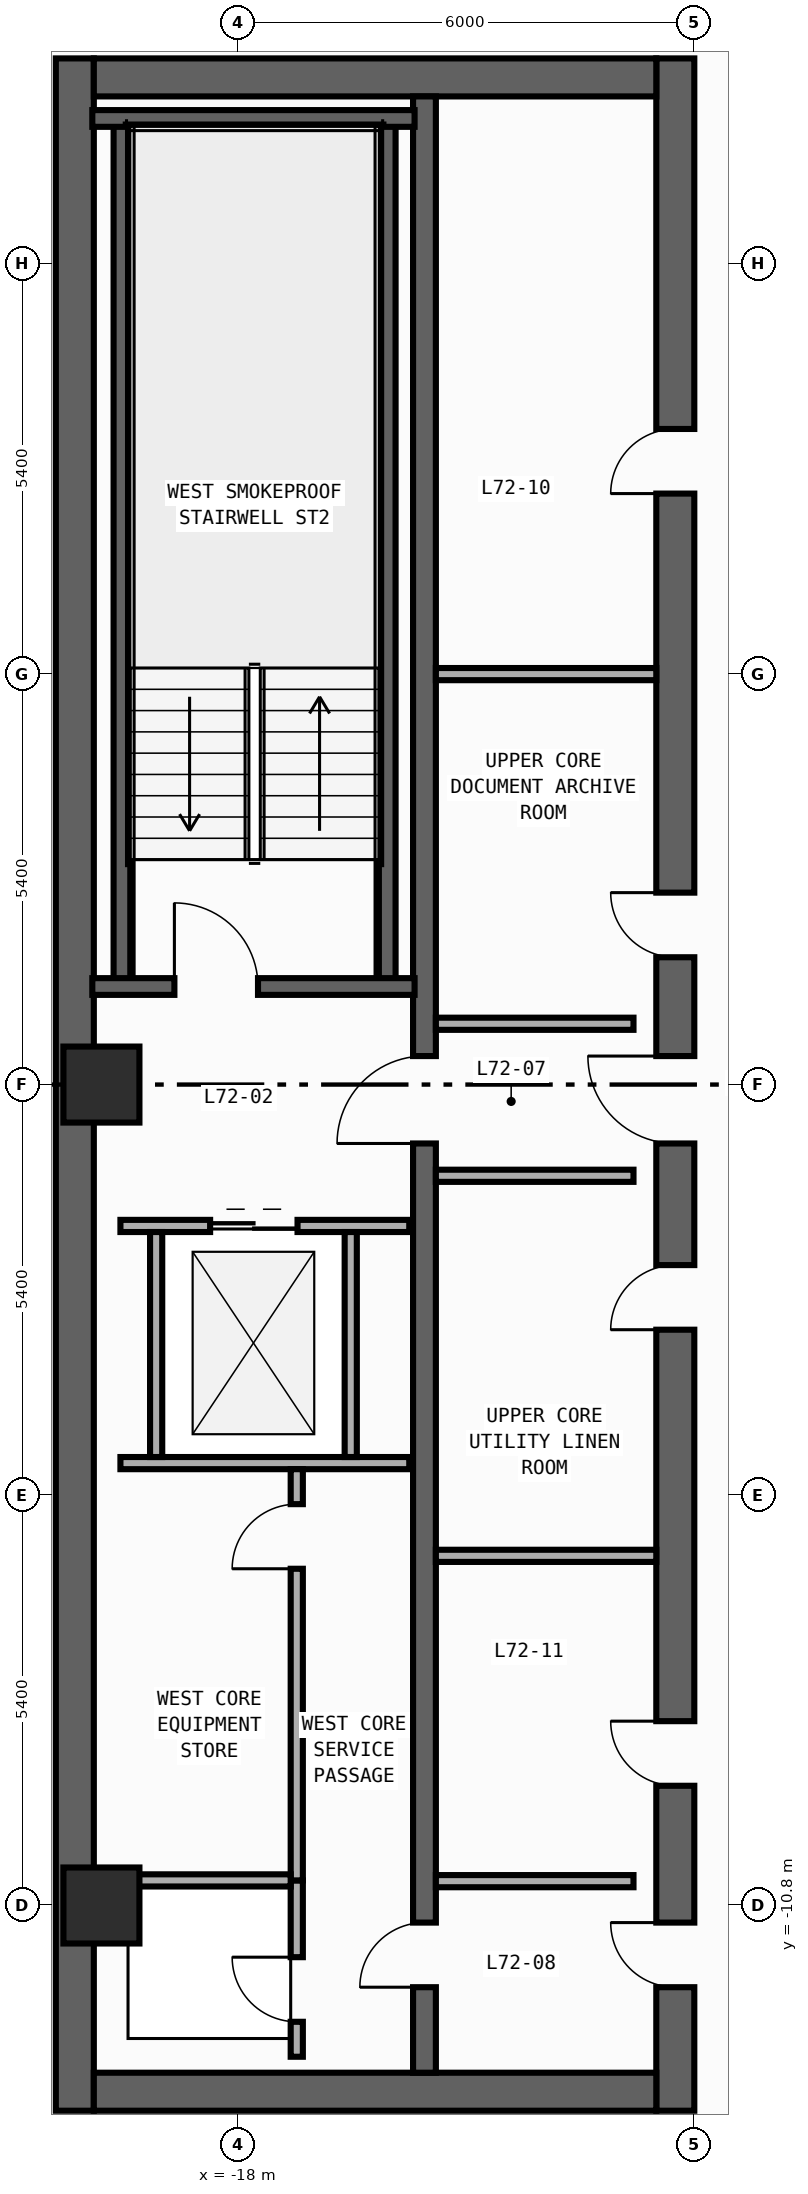
"""IFC4 building model, lengths in metres.
Left out: names, types, materials, properties, quantities, classifications, styles, units other than length and angle.
Written with IfcOpenShell. Run it as: python <this file> out.ifc"""

import sys

from ifc_helpers import new_model, si_unit, direction, frame, frame_2d, origin, origin_2d, place, context, subcontext, project, spatial, rectangle, circle, extrude, element, fill, save


model = new_model("IFC4")
c1 = context("Model", 3, precision=1e-05, world=origin(), true_north=direction((0.0, 1.0)))
c2 = subcontext(c1, "Body", "Model", "MODEL_VIEW")
j1 = project(units=[si_unit("LENGTHUNIT", "METRE"), si_unit("PLANEANGLEUNIT", "RADIAN")], contexts=[c1])
p1 = place(None, origin())
s1 = spatial("IfcSite", under=j1, at=p1, CompositionType="ELEMENT")
p2 = place(p1, origin())
s2 = spatial("IfcBuilding", under=s1, at=p2, CompositionType="ELEMENT")
p3 = place(p2, frame((0.0, 0.0, 300.4)))
s3 = spatial("IfcBuildingStorey", under=s2, at=p3, CompositionType="ELEMENT", Elevation=300.4)
p4 = place(p3, frame((-20.15, -13.5, 0.0), z_axis=(0.0, 0.0, 1.0), x_axis=(0.0, 1.0, 0.0)))
e1 = element("IfcWall", 1, at=p4, inside=s3, PredefinedType="SHEAR", context=c2, shape_type="SweptSolid", body=[
    extrude(rectangle(XDim=27.0, YDim=0.5, at=frame_2d((13.5, 0.0))), origin(), (0.0, 0.0, 1.0), 3.54),
])
p5 = place(p3, frame((-12.25, -13.5, 0.0), z_axis=(0.0, 0.0, 1.0), x_axis=(0.0, 1.0, 0.0)))
e2 = element("IfcWall", 2, at=p5, inside=s3, PredefinedType="SHEAR", context=c2, shape_type="SweptSolid", body=[
    extrude(rectangle(XDim=27.0, YDim=0.5, at=frame_2d((13.5, 0.0))), origin(), (0.0, 0.0, 1.0), 3.54),
])
p6 = place(p5, frame((15.175, 0.0, 0.0)))
e3 = element("IfcOpeningElement", 3, at=p6, cuts=e2, PredefinedType="OPENING", context=c2, shape_type="SweptSolid", body=[
    extrude(rectangle(XDim=0.85, YDim=2.1, at=frame_2d((0.425, 1.05))), frame((0.0, 0.26, 0.0), z_axis=(0.0, -1.0, 0.0), x_axis=(1.0, 0.0, 0.0)), (0.0, 0.0, 1.0), 0.52),
])
p7 = place(p5, frame((21.275, 0.0, 0.0)))
e4 = element("IfcOpeningElement", 4, at=p7, cuts=e2, PredefinedType="OPENING", context=c2, shape_type="SweptSolid", body=[
    extrude(rectangle(XDim=0.85, YDim=2.1, at=frame_2d((0.425, 1.05))), frame((0.0, 0.26, 0.0), z_axis=(0.0, -1.0, 0.0), x_axis=(1.0, 0.0, 0.0)), (0.0, 0.0, 1.0), 0.52),
])
p8 = place(p5, frame((4.275, 0.0, 0.0)))
e5 = element("IfcOpeningElement", 5, at=p8, cuts=e2, PredefinedType="OPENING", context=c2, shape_type="SweptSolid", body=[
    extrude(rectangle(XDim=0.85, YDim=2.1, at=frame_2d((0.425, 1.05))), frame((0.0, 0.26, 0.0), z_axis=(0.0, -1.0, 0.0), x_axis=(1.0, 0.0, 0.0)), (0.0, 0.0, 1.0), 0.52),
])
p9 = place(p5, frame((10.275, 0.0, 0.0)))
e6 = element("IfcOpeningElement", 6, at=p9, cuts=e2, PredefinedType="OPENING", context=c2, shape_type="SweptSolid", body=[
    extrude(rectangle(XDim=0.85, YDim=2.1, at=frame_2d((0.425, 1.05))), frame((0.0, 0.26, 0.0), z_axis=(0.0, -1.0, 0.0), x_axis=(1.0, 0.0, 0.0)), (0.0, 0.0, 1.0), 0.52),
])
p10 = place(p5, frame((12.725, 0.0, 0.0)))
e7 = element("IfcOpeningElement", 7, at=p10, cuts=e2, PredefinedType="OPENING", context=c2, shape_type="SweptSolid", body=[
    extrude(rectangle(XDim=1.15, YDim=2.2, at=frame_2d((0.575, 1.1))), frame((0.0, 0.26, 0.0), z_axis=(0.0, -1.0, 0.0), x_axis=(1.0, 0.0, 0.0)), (0.0, 0.0, 1.0), 0.52),
])
p11 = place(p5, frame((1.625, 0.0, 0.0)))
e8 = element("IfcOpeningElement", 8, at=p11, cuts=e2, PredefinedType="OPENING", context=c2, shape_type="SweptSolid", body=[
    extrude(rectangle(XDim=0.85, YDim=2.1, at=frame_2d((0.425, 1.05))), frame((0.0, 0.26, 0.0), z_axis=(0.0, -1.0, 0.0), x_axis=(1.0, 0.0, 0.0)), (0.0, 0.0, 1.0), 0.52),
])
for number, where, z_axis, x_axis in (
    (9, (-19.9, -13.25, 0.0), (0.0, 0.0, 1.0), (1.0, 0.0, 0.0)),
    (10, (-19.9, 13.25, 0.0), (0.0, 0.0, 1.0), (1.0, 0.0, 0.0)),
):
    element("IfcWall", number, at=place(p3, frame(where, z_axis=z_axis, x_axis=x_axis)), inside=s3, PredefinedType="SHEAR", context=c2, shape_type="SweptSolid", body=[
        extrude(rectangle(XDim=7.4, YDim=0.5, at=frame_2d((3.7, 0.0))), origin(), (0.0, 0.0, 1.0), 3.54),
    ])
p12 = place(p3, frame((-15.55, -13.0, 0.0), z_axis=(0.0, 0.0, 1.0), x_axis=(0.0, 1.0, 0.0)))
e11 = element("IfcWall", 11, at=p12, inside=s3, PredefinedType="SHEAR", context=c2, shape_type="SweptSolid", body=[
    extrude(rectangle(XDim=26.0, YDim=0.3, at=frame_2d((13.0, 0.0))), origin(), (0.0, 0.0, 1.0), 3.54),
])
p13 = place(p12, frame((12.225, 0.0, 0.0)))
e12 = element("IfcOpeningElement", 12, at=p13, cuts=e11, PredefinedType="OPENING", context=c2, shape_type="SweptSolid", body=[
    extrude(rectangle(XDim=1.15, YDim=2.2, at=frame_2d((0.575, 1.1))), frame((0.0, 0.16, 0.0), z_axis=(0.0, -1.0, 0.0), x_axis=(1.0, 0.0, 0.0)), (0.0, 0.0, 1.0), 0.32),
])
p14 = place(p12, frame((1.125, 0.0, 0.0)))
e13 = element("IfcOpeningElement", 13, at=p14, cuts=e11, PredefinedType="OPENING", context=c2, shape_type="SweptSolid", body=[
    extrude(rectangle(XDim=0.85, YDim=2.1, at=frame_2d((0.425, 1.05))), frame((0.0, 0.16, 0.0), z_axis=(0.0, -1.0, 0.0), x_axis=(1.0, 0.0, 0.0)), (0.0, 0.0, 1.0), 0.32),
])
for number, where, z_axis, x_axis in (
    (14, (-16.04, 1.29, 0.0), (0.0, 0.0, 1.0), (0.0, 1.0, 0.0)),
    (15, (-19.53, 1.29, 0.0), (0.0, 0.0, 1.0), (0.0, 1.0, 0.0)),
):
    element("IfcWall", number, at=place(p3, frame(where, z_axis=z_axis, x_axis=x_axis)), inside=s3, PredefinedType="SHEAR", context=c2, shape_type="SweptSolid", body=[
        extrude(rectangle(XDim=11.42, YDim=0.22, at=frame_2d((5.71, 0.0))), origin(), (0.0, 0.0, 1.0), 3.54),
    ])
p15 = place(p3, frame((-19.92, 12.71, 0.0), z_axis=(0.0, 0.0, 1.0), x_axis=(1.0, 0.0, 0.0)))
e16 = element("IfcWall", 16, at=p15, inside=s3, PredefinedType="SHEAR", context=c2, shape_type="SweptSolid", body=[
    extrude(rectangle(XDim=4.24, YDim=0.22, at=frame_2d((2.12, 0.0))), origin(), (0.0, 0.0, 1.0), 3.54),
])
p16 = place(p3, frame((-19.92, 1.29, 0.0), z_axis=(0.0, 0.0, 1.0), x_axis=(1.0, 0.0, 0.0)))
e17 = element("IfcWall", 17, at=p16, inside=s3, PredefinedType="SHEAR", context=c2, shape_type="SweptSolid", body=[
    extrude(rectangle(XDim=4.24, YDim=0.22, at=frame_2d((2.12, 0.0))), origin(), (0.0, 0.0, 1.0), 3.54),
])
p17 = place(p16, frame((1.08, 0.0, 0.0)))
e18 = element("IfcOpeningElement", 18, at=p17, cuts=e17, PredefinedType="OPENING", context=c2, shape_type="SweptSolid", body=[
    extrude(rectangle(XDim=1.1, YDim=2.2, at=frame_2d((0.55, 1.1))), frame((0.0, 0.12, 0.0), z_axis=(0.0, -1.0, 0.0), x_axis=(1.0, 0.0, 0.0)), (0.0, 0.0, 1.0), 0.24),
])
for number, where, z_axis, x_axis in (
    (19, (-19.8, -10.8, 0.0), (0.0, 0.0, 1.0), (1.0, 0.0, 0.0)),
    (20, (-19.8, 0.0, 0.0), (0.0, 0.0, 1.0), (1.0, 0.0, 0.0)),
):
    element("IfcColumn", number, at=place(p3, frame(where, z_axis=z_axis, x_axis=x_axis)), inside=s3, PredefinedType="COLUMN", context=c2, shape_type="SweptSolid", body=[
        extrude(circle(Radius=0.5, at=origin_2d()), origin(), (0.0, 0.0, 1.0), 3.8),
    ])
p18 = place(p3, frame((-19.55, -1.86, 0.0), z_axis=(0.0, 0.0, 1.0), x_axis=(1.0, 0.0, 0.0)))
e21 = element("IfcWall", 21, at=p18, inside=s3, PredefinedType="STANDARD", context=c2, shape_type="SweptSolid", body=[
    extrude(rectangle(XDim=3.8, YDim=0.16, at=frame_2d((1.9, 0.0))), origin(), (0.0, 0.0, 1.0), 3.54),
])
p19 = place(p18, frame((1.18, 0.0, 0.0)))
e22 = element("IfcOpeningElement", 22, at=p19, cuts=e21, PredefinedType="OPENING", context=c2, shape_type="SweptSolid", body=[
    extrude(rectangle(XDim=1.15, YDim=2.2, at=frame_2d((0.575, 1.1))), frame((0.0, 0.09, 0.0), z_axis=(0.0, -1.0, 0.0), x_axis=(1.0, 0.0, 0.0)), (0.0, 0.0, 1.0), 0.18),
])
p20 = place(p3, frame((-19.55, -4.98, 0.0), z_axis=(0.0, 0.0, 1.0), x_axis=(1.0, 0.0, 0.0)))
e23 = element("IfcWall", 23, at=p20, inside=s3, PredefinedType="STANDARD", context=c2, shape_type="SweptSolid", body=[
    extrude(rectangle(XDim=3.8, YDim=0.16, at=frame_2d((1.9, 0.0))), origin(), (0.0, 0.0, 1.0), 3.54),
])
for number, where, z_axis, x_axis in (
    (24, (-19.08, -4.9, 0.0), (0.0, 0.0, 1.0), (0.0, 1.0, 0.0)),
    (25, (-16.52, -4.9, 0.0), (0.0, 0.0, 1.0), (0.0, 1.0, 0.0)),
):
    element("IfcWall", number, at=place(p3, frame(where, z_axis=z_axis, x_axis=x_axis)), inside=s3, PredefinedType="STANDARD", context=c2, shape_type="SweptSolid", body=[
        extrude(rectangle(XDim=2.96, YDim=0.16, at=frame_2d((1.48, 0.0))), origin(), (0.0, 0.0, 1.0), 3.54),
    ])
for number, where, z_axis, x_axis in (
    (26, (-15.4, 0.8, 0.0), (0.0, 0.0, 1.0), (1.0, 0.0, 0.0)),
    (27, (-15.4, -1.2, 0.0), (0.0, 0.0, 1.0), (1.0, 0.0, 0.0)),
    (28, (-15.4, -10.48, 0.0), (0.0, 0.0, 1.0), (1.0, 0.0, 0.0)),
):
    element("IfcWall", number, at=place(p3, frame(where, z_axis=z_axis, x_axis=x_axis)), inside=s3, PredefinedType="STANDARD", context=c2, shape_type="SweptSolid", body=[
        extrude(rectangle(XDim=2.6, YDim=0.16, at=frame_2d((1.3, 0.0))), origin(), (0.0, 0.0, 1.0), 3.54),
    ])
p21 = place(p3, frame((-17.23, -12.79, 0.0), z_axis=(0.0, 0.0, 1.0), x_axis=(0.0, 1.0, 0.0)))
e29 = element("IfcWall", 29, at=p21, inside=s3, PredefinedType="PARTITIONING", context=c2, shape_type="SweptSolid", body=[
    extrude(rectangle(XDim=2.32, YDim=0.16, at=frame_2d((1.16, 0.0))), origin(), (0.0, 0.0, 1.0), 3.54),
])
p22 = place(p21, frame((0.46, 0.0, 0.0)))
e30 = element("IfcOpeningElement", 30, at=p22, cuts=e29, PredefinedType="OPENING", context=c2, shape_type="SweptSolid", body=[
    extrude(rectangle(XDim=0.85, YDim=2.1, at=frame_2d((0.425, 1.05))), frame((0.0, 0.09, 0.0), z_axis=(0.0, -1.0, 0.0), x_axis=(1.0, 0.0, 0.0)), (0.0, 0.0, 1.0), 0.18),
])
p23 = place(p3, frame((-17.23, -10.47, 0.0), z_axis=(0.0, 0.0, 1.0), x_axis=(0.0, 1.0, 0.0)))
e31 = element("IfcWall", 31, at=p23, inside=s3, PredefinedType="PARTITIONING", context=c2, shape_type="SweptSolid", body=[
    extrude(rectangle(XDim=5.41, YDim=0.16, at=frame_2d((2.705, 0.0))), origin(), (0.0, 0.0, 1.0), 3.54),
])
p24 = place(p23, frame((4.1, 0.0, 0.0)))
e32 = element("IfcOpeningElement", 32, at=p24, cuts=e31, PredefinedType="OPENING", context=c2, shape_type="SweptSolid", body=[
    extrude(rectangle(XDim=0.85, YDim=2.1, at=frame_2d((0.425, 1.05))), frame((0.0, 0.09, 0.0), z_axis=(0.0, -1.0, 0.0), x_axis=(1.0, 0.0, 0.0)), (0.0, 0.0, 1.0), 0.18),
])
p25 = place(p3, frame((-19.75, -10.47, 0.0), z_axis=(0.0, 0.0, 1.0), x_axis=(1.0, 0.0, 0.0)))
e33 = element("IfcWall", 33, at=p25, inside=s3, PredefinedType="PARTITIONING", context=c2, shape_type="SweptSolid", body=[
    extrude(rectangle(XDim=2.44, YDim=0.16, at=frame_2d((1.22, 0.0))), origin(), (0.0, 0.0, 1.0), 3.54),
])
for number, where, z_axis, x_axis in (
    (34, (-15.4, 5.4, 0.0), (0.0, 0.0, 1.0), (1.0, 0.0, 0.0)),
    (35, (-15.4, -6.2, 0.0), (0.0, 0.0, 1.0), (1.0, 0.0, 0.0)),
):
    element("IfcWall", number, at=place(p3, frame(where, z_axis=z_axis, x_axis=x_axis)), inside=s3, PredefinedType="PARTITIONING", context=c2, shape_type="SweptSolid", body=[
        extrude(rectangle(XDim=2.9, YDim=0.16, at=frame_2d((1.45, 0.0))), origin(), (0.0, 0.0, 1.0), 3.54),
    ])
p26 = place(p17, origin())
e36 = element("IfcDoor", 36, at=p26, inside=s3, OperationType="SINGLE_SWING_LEFT", PredefinedType="DOOR", context=c2, shape_type="SweptSolid", body=[
    extrude(rectangle(XDim=1.1, YDim=2.2, at=frame_2d((0.55, 1.1))), frame((0.0, 0.025, 0.0), z_axis=(0.0, -1.0, 0.0), x_axis=(1.0, 0.0, 0.0)), (0.0, 0.0, 1.0), 0.05),
])
fill(e18, e36)
p27 = place(p6, origin())
e37 = element("IfcDoor", 37, at=p27, inside=s3, OperationType="SINGLE_SWING_RIGHT", PredefinedType="DOOR", context=c2, shape_type="SweptSolid", body=[
    extrude(rectangle(XDim=0.85, YDim=2.1, at=frame_2d((0.425, 1.05))), frame((0.0, 0.025, 0.0), z_axis=(0.0, -1.0, 0.0), x_axis=(1.0, 0.0, 0.0)), (0.0, 0.0, 1.0), 0.05),
])
fill(e3, e37)
p28 = place(p7, origin())
e38 = element("IfcDoor", 38, at=p28, inside=s3, OperationType="SINGLE_SWING_LEFT", PredefinedType="DOOR", context=c2, shape_type="SweptSolid", body=[
    extrude(rectangle(XDim=0.85, YDim=2.1, at=frame_2d((0.425, 1.05))), frame((0.0, 0.025, 0.0), z_axis=(0.0, -1.0, 0.0), x_axis=(1.0, 0.0, 0.0)), (0.0, 0.0, 1.0), 0.05),
])
fill(e4, e38)
p29 = place(p8, origin())
e39 = element("IfcDoor", 39, at=p29, inside=s3, OperationType="SINGLE_SWING_RIGHT", PredefinedType="DOOR", context=c2, shape_type="SweptSolid", body=[
    extrude(rectangle(XDim=0.85, YDim=2.1, at=frame_2d((0.425, 1.05))), frame((0.0, 0.025, 0.0), z_axis=(0.0, -1.0, 0.0), x_axis=(1.0, 0.0, 0.0)), (0.0, 0.0, 1.0), 0.05),
])
fill(e5, e39)
p30 = place(p9, origin())
e40 = element("IfcDoor", 40, at=p30, inside=s3, OperationType="SINGLE_SWING_LEFT", PredefinedType="DOOR", context=c2, shape_type="SweptSolid", body=[
    extrude(rectangle(XDim=0.85, YDim=2.1, at=frame_2d((0.425, 1.05))), frame((0.0, 0.025, 0.0), z_axis=(0.0, -1.0, 0.0), x_axis=(1.0, 0.0, 0.0)), (0.0, 0.0, 1.0), 0.05),
])
fill(e6, e40)
p31 = place(p10, origin())
e41 = element("IfcDoor", 41, at=p31, inside=s3, OperationType="SINGLE_SWING_RIGHT", PredefinedType="DOOR", context=c2, shape_type="SweptSolid", body=[
    extrude(rectangle(XDim=1.15, YDim=2.2, at=frame_2d((0.575, 1.1))), frame((0.0, 0.025, 0.0), z_axis=(0.0, -1.0, 0.0), x_axis=(1.0, 0.0, 0.0)), (0.0, 0.0, 1.0), 0.05),
])
fill(e7, e41)
p32 = place(p13, origin())
e42 = element("IfcDoor", 42, at=p32, inside=s3, OperationType="SINGLE_SWING_LEFT", PredefinedType="DOOR", context=c2, shape_type="SweptSolid", body=[
    extrude(rectangle(XDim=1.15, YDim=2.2, at=frame_2d((0.575, 1.1))), frame((0.0, 0.025, 0.0), z_axis=(0.0, -1.0, 0.0), x_axis=(1.0, 0.0, 0.0)), (0.0, 0.0, 1.0), 0.05),
])
fill(e12, e42)
p33 = place(p11, origin())
e43 = element("IfcDoor", 43, at=p33, inside=s3, OperationType="SINGLE_SWING_RIGHT", PredefinedType="DOOR", context=c2, shape_type="SweptSolid", body=[
    extrude(rectangle(XDim=0.85, YDim=2.1, at=frame_2d((0.425, 1.05))), frame((0.0, 0.025, 0.0), z_axis=(0.0, -1.0, 0.0), x_axis=(1.0, 0.0, 0.0)), (0.0, 0.0, 1.0), 0.05),
])
fill(e8, e43)
p34 = place(p14, origin())
e44 = element("IfcDoor", 44, at=p34, inside=s3, OperationType="SINGLE_SWING_LEFT", PredefinedType="DOOR", context=c2, shape_type="SweptSolid", body=[
    extrude(rectangle(XDim=0.85, YDim=2.1, at=frame_2d((0.425, 1.05))), frame((0.0, 0.025, 0.0), z_axis=(0.0, -1.0, 0.0), x_axis=(1.0, 0.0, 0.0)), (0.0, 0.0, 1.0), 0.05),
])
fill(e13, e44)
p35 = place(p19, origin())
e45 = element("IfcDoor", 45, at=p35, inside=s3, OperationType="DOUBLE_DOOR_SLIDING", PredefinedType="DOOR", context=c2, shape_type="SweptSolid", body=[
    extrude(rectangle(XDim=1.15, YDim=2.2, at=frame_2d((0.575, 1.1))), frame((0.0, 0.025, 0.0), z_axis=(0.0, -1.0, 0.0), x_axis=(1.0, 0.0, 0.0)), (0.0, 0.0, 1.0), 0.05),
])
fill(e22, e45)
p36 = place(p22, origin())
e46 = element("IfcDoor", 46, at=p36, inside=s3, OperationType="SINGLE_SWING_RIGHT", PredefinedType="DOOR", context=c2, shape_type="SweptSolid", body=[
    extrude(rectangle(XDim=0.85, YDim=2.1, at=frame_2d((0.425, 1.05))), frame((0.0, 0.025, 0.0), z_axis=(0.0, -1.0, 0.0), x_axis=(1.0, 0.0, 0.0)), (0.0, 0.0, 1.0), 0.05),
])
fill(e30, e46)
p37 = place(p24, origin())
e47 = element("IfcDoor", 47, at=p37, inside=s3, OperationType="SINGLE_SWING_LEFT", PredefinedType="DOOR", context=c2, shape_type="SweptSolid", body=[
    extrude(rectangle(XDim=0.85, YDim=2.1, at=frame_2d((0.425, 1.05))), frame((0.0, 0.025, 0.0), z_axis=(0.0, -1.0, 0.0), x_axis=(1.0, 0.0, 0.0)), (0.0, 0.0, 1.0), 0.05),
])
fill(e32, e47)
save(model, sys.argv[1])
